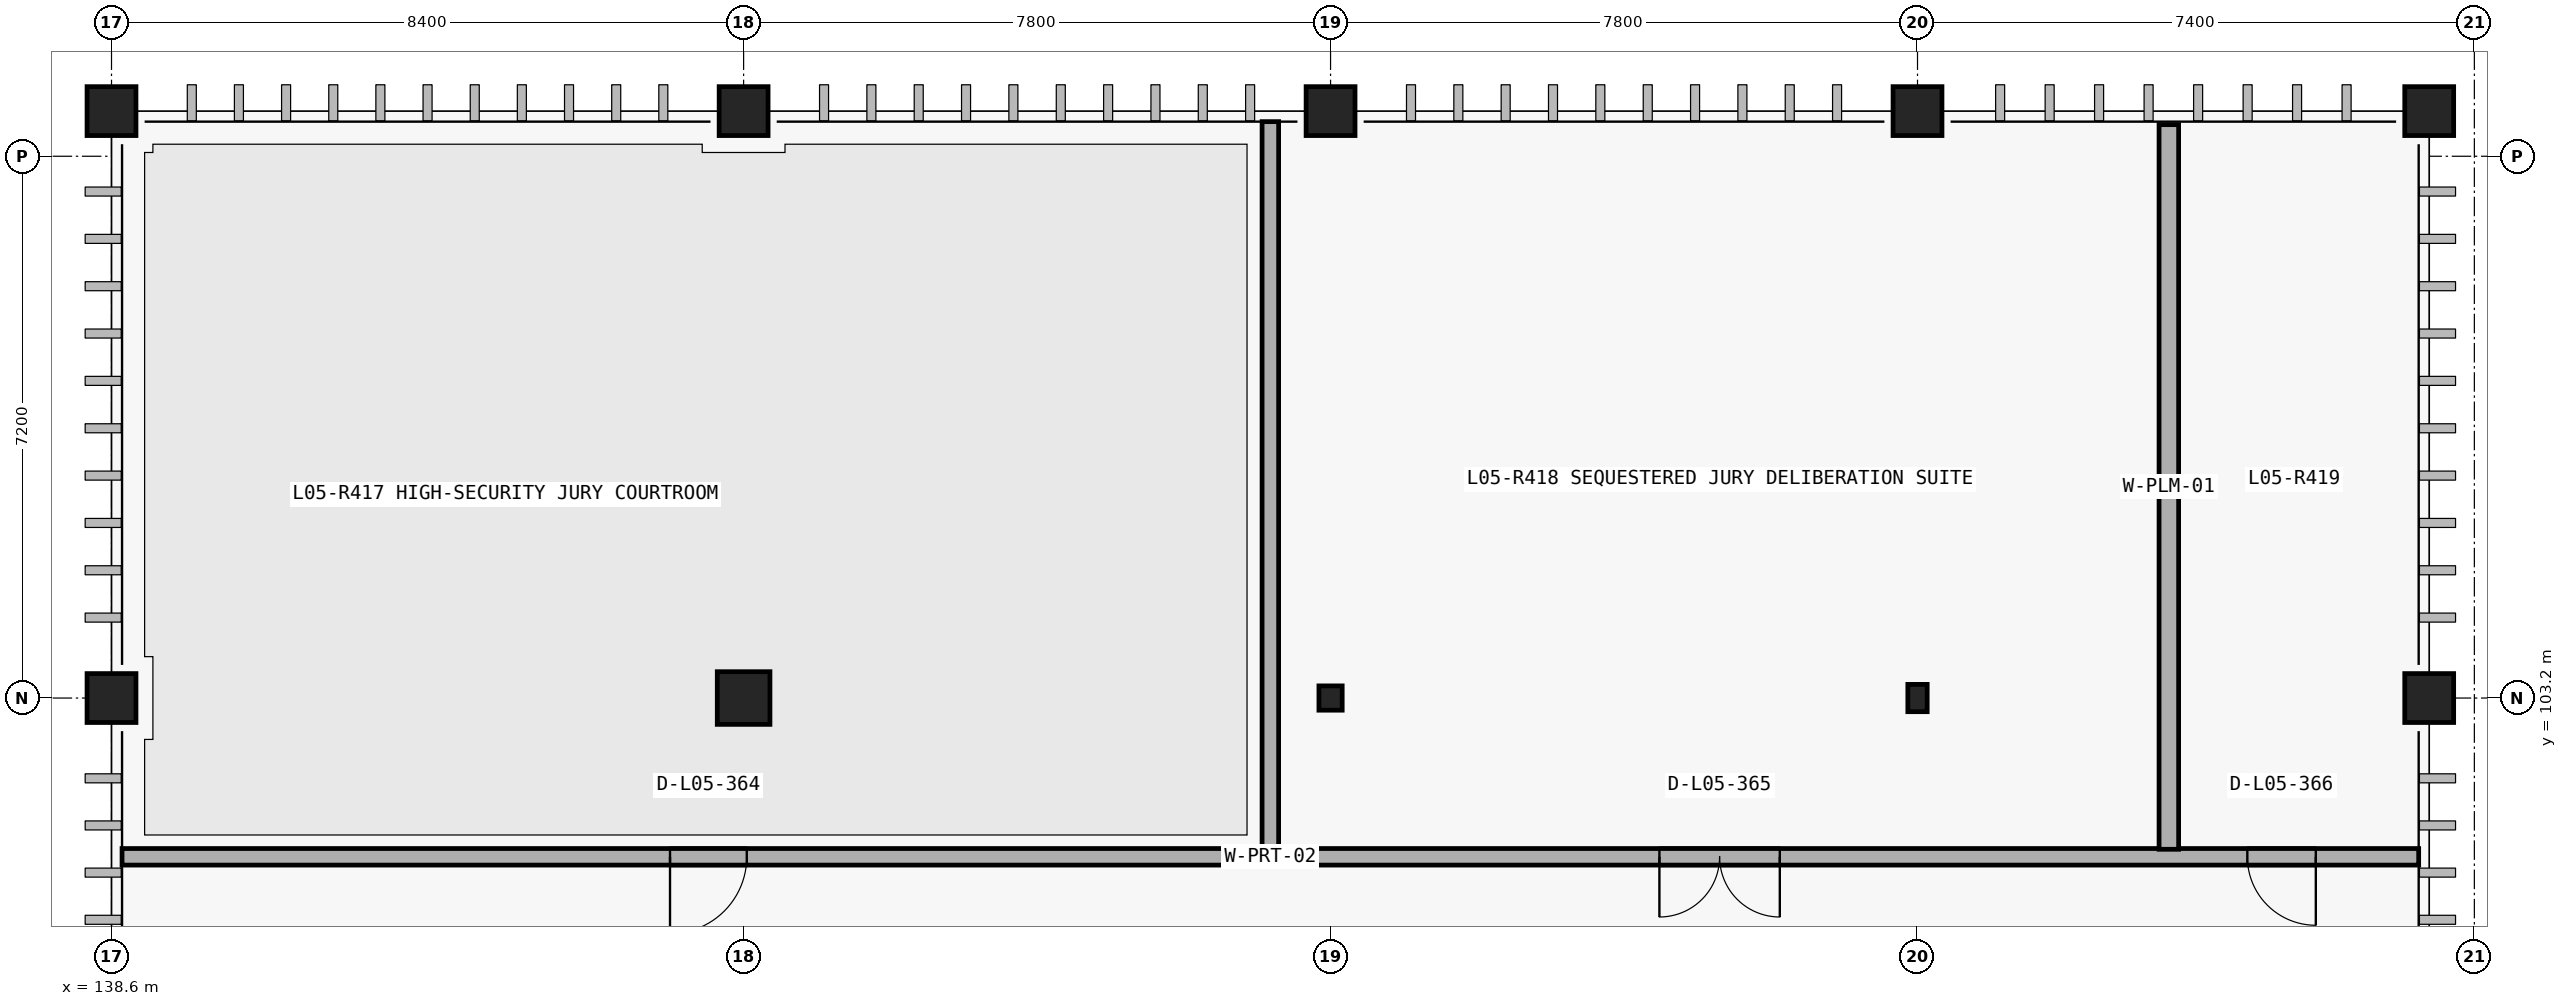
"""IFC4 building model, lengths in metres.
Left out: names, types, materials, properties, quantities, classifications, styles, units other than length and angle.
Written with IfcOpenShell. Run it as: python <this file> out.ifc"""

import sys

from ifc_helpers import new_model, si_unit, direction, frame, frame_2d, origin_with_axes, origin_2d_with_axis, place, context, subcontext, project, spatial, rectangle, circle, i_section, extrude, element, fill, save


model = new_model("IFC4")
c1 = context("Model", 3, precision=1e-05, world=origin_with_axes(), true_north=direction((0.0, 1.0)))
c2 = subcontext(c1, "Body", "Model", "MODEL_VIEW")
j1 = project(units=[si_unit("LENGTHUNIT", "METRE"), si_unit("PLANEANGLEUNIT", "RADIAN")], contexts=[c1])
p1 = place(None, origin_with_axes())
s1 = spatial("IfcSite", under=j1, at=p1, CompositionType="ELEMENT")
p2 = place(p1, origin_with_axes())
s2 = spatial("IfcBuilding", under=s1, at=p2, CompositionType="ELEMENT")
p3 = place(p2, frame((0.0, 0.0, 24.9), z_axis=(0.0, 0.0, 1.0), x_axis=(1.0, 0.0, 0.0)))
s3 = spatial("IfcBuildingStorey", under=s2, at=p3, CompositionType="ELEMENT", Elevation=24.9)
p4 = place(None, frame((138.74, 101.09, 24.9), z_axis=(0.0, 0.0, 1.0), x_axis=(1.0, 0.0, 0.0)))
e1 = element("IfcWall", 1, at=p4, inside=s3, PredefinedType="PARTITIONING", context=c2, shape_type="SweptSolid", body=[
    extrude(rectangle(XDim=30.52, YDim=0.22, at=frame_2d((15.26, 0.0), x_axis=(1.0, 0.0))), origin_with_axes(), (0.0, 0.0, 1.0), 4.44),
])
p5 = place(None, frame((146.532, 101.09, 24.9), z_axis=(0.0, 0.0, 1.0), x_axis=(1.0, 0.0, 0.0)))
e2 = element("IfcOpeningElement", 2, at=p5, cuts=e1, PredefinedType="OPENING", context=c2, shape_type="SweptSolid", body=[
    extrude(rectangle(XDim=1.02, YDim=2.36, at=frame_2d((0.0, 1.18), x_axis=(1.0, 0.0))), frame((0.0, 0.12, 0.0), z_axis=(0.0, -1.0, 0.0), x_axis=(1.0, 0.0, 0.0)), (0.0, 0.0, 1.0), 0.24),
])
p6 = place(None, frame((159.97, 101.09, 24.9), z_axis=(0.0, 0.0, 1.0), x_axis=(1.0, 0.0, 0.0)))
e3 = element("IfcOpeningElement", 3, at=p6, cuts=e1, PredefinedType="OPENING", context=c2, shape_type="SweptSolid", body=[
    extrude(rectangle(XDim=1.6, YDim=2.32, at=frame_2d((0.0, 1.16), x_axis=(1.0, 0.0))), frame((0.0, 0.12, 0.0), z_axis=(0.0, -1.0, 0.0), x_axis=(1.0, 0.0, 0.0)), (0.0, 0.0, 1.0), 0.24),
])
p7 = place(None, frame((167.438, 101.09, 24.9), z_axis=(0.0, 0.0, 1.0), x_axis=(1.0, 0.0, 0.0)))
e4 = element("IfcOpeningElement", 4, at=p7, cuts=e1, PredefinedType="OPENING", context=c2, shape_type="SweptSolid", body=[
    extrude(rectangle(XDim=0.91, YDim=2.12, at=frame_2d((0.0, 1.06), x_axis=(1.0, 0.0))), frame((0.0, 0.12, 0.0), z_axis=(0.0, -1.0, 0.0), x_axis=(1.0, 0.0, 0.0)), (0.0, 0.0, 1.0), 0.24),
])
p8 = place(None, frame((165.94, 101.19, 24.9), z_axis=(0.0, 0.0, 1.0), x_axis=(0.0, 1.0, 0.0)))
e5 = element("IfcWall", 5, at=p8, inside=s3, PredefinedType="PLUMBINGWALL", context=c2, shape_type="SweptSolid", body=[
    extrude(rectangle(XDim=9.63, YDim=0.26, at=frame_2d((4.815, 0.0), x_axis=(1.0, 0.0))), origin_with_axes(), (0.0, 0.0, 1.0), 4.44),
])
p9 = place(None, frame((154.0, 101.09, 24.9), z_axis=(0.0, 0.0, 1.0), x_axis=(0.0, 1.0, 0.0)))
e6 = element("IfcWall", 6, at=p9, inside=s3, PredefinedType="PARTITIONING", context=c2, shape_type="SweptSolid", body=[
    extrude(rectangle(XDim=9.77, YDim=0.22, at=frame_2d((4.885, 0.0), x_axis=(1.0, 0.0))), origin_with_axes(), (0.0, 0.0, 1.0), 4.44),
])
for number, where, z_axis, x_axis in (
    (7, (138.6, 103.2, 24.9), (0.0, 0.0, 1.0), (1.0, 0.0, 0.0)),
    (8, (138.6, 111.0, 24.9), (0.0, 0.0, 1.0), (1.0, 0.0, 0.0)),
):
    element("IfcColumn", number, at=place(None, frame(where, z_axis=z_axis, x_axis=x_axis)), inside=s3, PredefinedType="COLUMN", context=c2, shape_type="SweptSolid", body=[
        extrude(circle(Radius=0.325, at=origin_2d_with_axis()), origin_with_axes(), (0.0, 0.0, 1.0), 4.8),
    ])
p10 = place(None, frame((147.0, 103.2, 24.9), z_axis=(0.0, 0.0, 1.0), x_axis=(1.0, 0.0, 0.0)))
e9 = element("IfcColumn", 9, at=p10, inside=s3, PredefinedType="COLUMN", context=c2, shape_type="SweptSolid", body=[
    extrude(rectangle(XDim=0.7, YDim=0.7, at=origin_2d_with_axis()), origin_with_axes(), (0.0, 0.0, 1.0), 4.8),
])
p11 = place(None, frame((147.0, 111.0, 24.9), z_axis=(0.0, 0.0, 1.0), x_axis=(1.0, 0.0, 0.0)))
e10 = element("IfcColumn", 10, at=p11, inside=s3, PredefinedType="COLUMN", context=c2, shape_type="SweptSolid", body=[
    extrude(circle(Radius=0.325, at=origin_2d_with_axis()), origin_with_axes(), (0.0, 0.0, 1.0), 4.8),
])
p12 = place(None, frame((154.8, 103.2, 24.9), z_axis=(0.0, 0.0, 1.0), x_axis=(1.0, 0.0, 0.0)))
e11 = element("IfcColumn", 11, at=p12, inside=s3, PredefinedType="COLUMN", context=c2, shape_type="SweptSolid", body=[
    extrude(i_section(OverallWidth=0.309, OverallDepth=0.323, WebThickness=0.014, FlangeThickness=0.023, at=origin_2d_with_axis()), origin_with_axes(), (0.0, 0.0, 1.0), 4.8),
])
p13 = place(None, frame((154.8, 111.0, 24.9), z_axis=(0.0, 0.0, 1.0), x_axis=(1.0, 0.0, 0.0)))
e12 = element("IfcColumn", 12, at=p13, inside=s3, PredefinedType="COLUMN", context=c2, shape_type="SweptSolid", body=[
    extrude(circle(Radius=0.325, at=origin_2d_with_axis()), origin_with_axes(), (0.0, 0.0, 1.0), 4.8),
])
p14 = place(None, frame((162.6, 103.2, 24.9), z_axis=(0.0, 0.0, 1.0), x_axis=(1.0, 0.0, 0.0)))
e13 = element("IfcColumn", 13, at=p14, inside=s3, PredefinedType="COLUMN", context=c2, shape_type="SweptSolid", body=[
    extrude(i_section(OverallWidth=0.257, OverallDepth=0.363, WebThickness=0.013, FlangeThickness=0.022, at=origin_2d_with_axis()), origin_with_axes(), (0.0, 0.0, 1.0), 4.8),
])
for number, where, z_axis, x_axis in (
    (14, (162.6, 111.0, 24.9), (0.0, 0.0, 1.0), (1.0, 0.0, 0.0)),
    (15, (169.4, 103.2, 24.9), (0.0, 0.0, 1.0), (1.0, 0.0, 0.0)),
    (16, (169.4, 111.0, 24.9), (0.0, 0.0, 1.0), (1.0, 0.0, 0.0)),
):
    element("IfcColumn", number, at=place(None, frame(where, z_axis=z_axis, x_axis=x_axis)), inside=s3, PredefinedType="COLUMN", context=c2, shape_type="SweptSolid", body=[
        extrude(circle(Radius=0.325, at=origin_2d_with_axis()), origin_with_axes(), (0.0, 0.0, 1.0), 4.8),
    ])
p15 = place(None, frame((146.532, 101.09, 24.9), z_axis=(0.0, 0.0, 1.0), x_axis=(-1.0, 0.0, 0.0)))
e17 = element("IfcDoor", 17, at=p15, inside=s3, OperationType="SINGLE_SWING_LEFT", PredefinedType="DOOR", context=c2, shape_type="SweptSolid", body=[
    extrude(rectangle(XDim=1.02, YDim=2.36, at=frame_2d((0.0, 1.18), x_axis=(1.0, 0.0))), frame((0.0, 0.04, 0.0), z_axis=(0.0, -1.0, 0.0), x_axis=(1.0, 0.0, 0.0)), (0.0, 0.0, 1.0), 0.08),
])
fill(e2, e17)
p16 = place(None, frame((159.97, 101.09, 24.9), z_axis=(0.0, 0.0, 1.0), x_axis=(-1.0, 0.0, 0.0)))
e18 = element("IfcDoor", 18, at=p16, inside=s3, OperationType="DOUBLE_DOOR_SINGLE_SWING", PredefinedType="DOOR", context=c2, shape_type="SweptSolid", body=[
    extrude(rectangle(XDim=1.6, YDim=2.32, at=frame_2d((0.0, 1.16), x_axis=(1.0, 0.0))), frame((0.0, 0.04, 0.0), z_axis=(0.0, -1.0, 0.0), x_axis=(1.0, 0.0, 0.0)), (0.0, 0.0, 1.0), 0.08),
])
fill(e3, e18)
p17 = place(None, frame((167.438, 101.09, 24.9), z_axis=(0.0, 0.0, 1.0), x_axis=(-1.0, 0.0, 0.0)))
e19 = element("IfcDoor", 19, at=p17, inside=s3, OperationType="SINGLE_SWING_RIGHT", PredefinedType="DOOR", context=c2, shape_type="SweptSolid", body=[
    extrude(rectangle(XDim=0.91, YDim=2.12, at=frame_2d((0.0, 1.06), x_axis=(1.0, 0.0))), frame((0.0, 0.04, 0.0), z_axis=(0.0, -1.0, 0.0), x_axis=(1.0, 0.0, 0.0)), (0.0, 0.0, 1.0), 0.08),
])
fill(e4, e19)
save(model, sys.argv[1])
